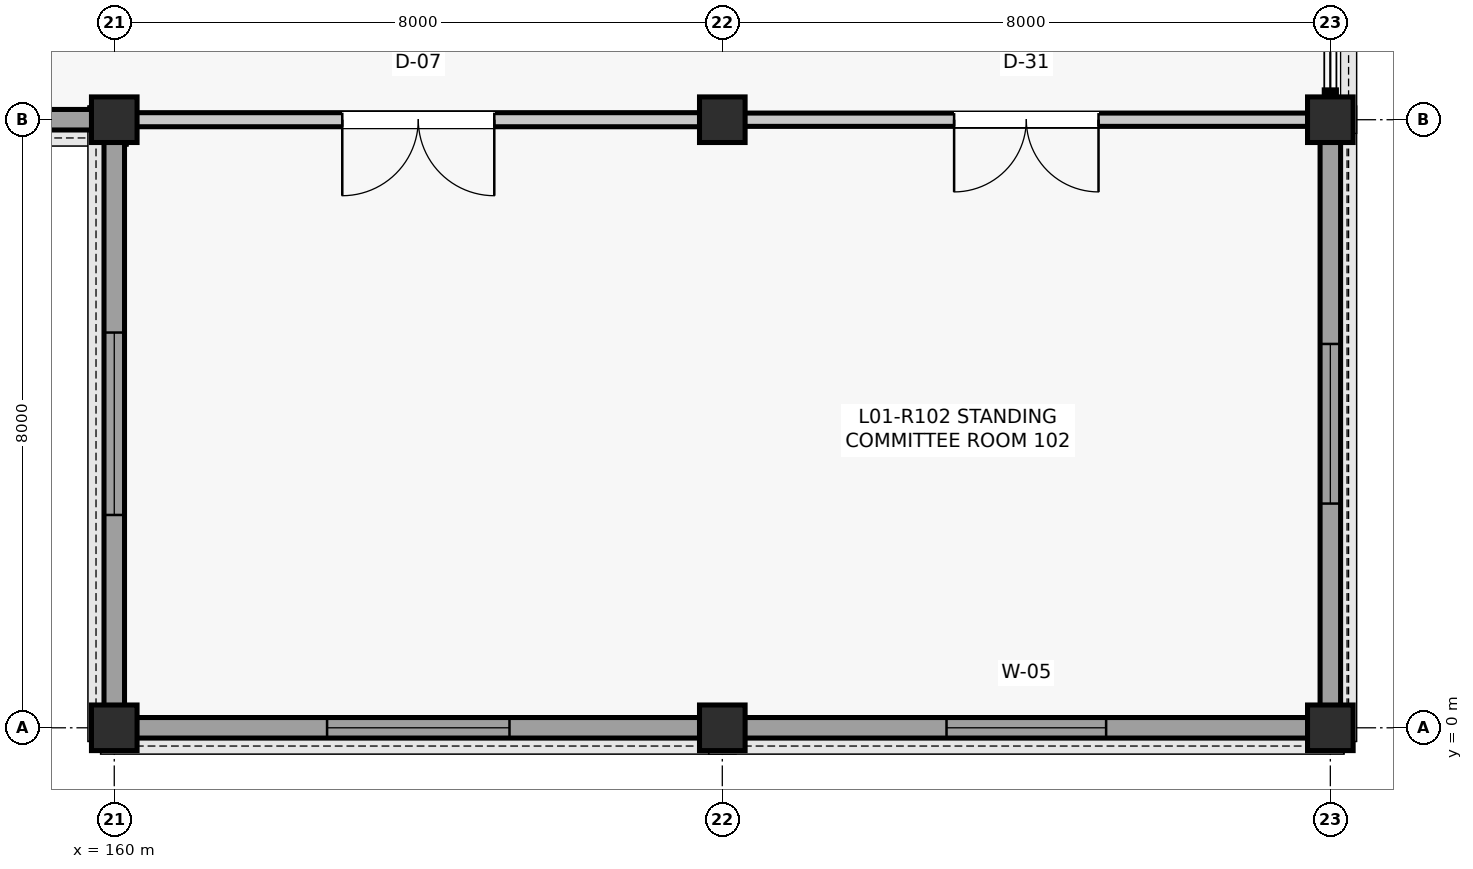
"""IFC4 building model, lengths in metres.
Left out: names, types, materials, properties, quantities, classifications, styles, units other than length and angle.
Written with IfcOpenShell. Run it as: python <this file> out.ifc"""

import sys

from ifc_helpers import new_model, si_unit, direction, frame, frame_2d, origin, origin_2d, place, context, subcontext, project, spatial, rectangle, extrude, element, fill, save


model = new_model("IFC4")
c1 = context("Model", 3, precision=1e-05, world=origin(), true_north=direction((0.0, 1.0)))
c2 = subcontext(c1, "Body", "Model", "MODEL_VIEW")
j1 = project(units=[si_unit("LENGTHUNIT", "METRE"), si_unit("PLANEANGLEUNIT", "RADIAN")], contexts=[c1])
p1 = place(None, origin())
s1 = spatial("IfcSite", under=j1, at=p1, CompositionType="ELEMENT")
p2 = place(p1, origin())
s2 = spatial("IfcBuilding", under=s1, at=p2, CompositionType="ELEMENT")
p3 = place(p2, frame((0.0, 0.0, 5.28)))
s3 = spatial("IfcBuildingStorey", under=s2, at=p3, CompositionType="ELEMENT", Elevation=5.28)
for number, where, z_axis, x_axis in (
    (1, (160.0, 0.0, 0.0), (0.0, 0.0, 1.0), (1.0, 0.0, 0.0)),
    (2, (160.0, 8.0, 0.0), (0.0, 0.0, 1.0), (1.0, 0.0, 0.0)),
    (3, (168.0, 0.0, 0.0), (0.0, 0.0, 1.0), (1.0, 0.0, 0.0)),
    (4, (168.0, 8.0, 0.0), (0.0, 0.0, 1.0), (1.0, 0.0, 0.0)),
    (5, (176.0, 0.0, 0.0), (0.0, 0.0, 1.0), (1.0, 0.0, 0.0)),
    (6, (176.0, 8.0, 0.0), (0.0, 0.0, 1.0), (1.0, 0.0, 0.0)),
):
    element("IfcColumn", number, at=place(p3, frame(where, z_axis=z_axis, x_axis=x_axis)), inside=s3, PredefinedType="COLUMN", context=c2, shape_type="SweptSolid", body=[
        extrude(rectangle(XDim=0.6, YDim=0.6, at=origin_2d()), origin(), (0.0, 0.0, 1.0), 4.62),
    ])
p4 = place(p3, frame((152.285, 8.0, 0.0), z_axis=(0.0, 0.0, 1.0), x_axis=(1.0, 0.0, 0.0)))
e7 = element("IfcWall", 7, at=p4, inside=s3, PredefinedType="SOLIDWALL", context=c2, shape_type="SweptSolid", body=[
    extrude(rectangle(XDim=7.43, YDim=0.27, at=frame_2d((3.715, 0.0))), origin(), (0.0, 0.0, 1.0), 3.974),
])
p5 = place(p4, frame((2.515, 0.0, 0.9)))
e8 = element("IfcOpeningElement", 8, at=p5, cuts=e7, PredefinedType="OPENING", context=c2, shape_type="SweptSolid", body=[
    extrude(rectangle(XDim=2.4, YDim=2.4, at=frame_2d((1.2, 1.2))), frame((0.0, 0.145, 0.0), z_axis=(0.0, -1.0, 0.0), x_axis=(1.0, 0.0, 0.0)), (0.0, 0.0, 1.0), 0.29),
])
p6 = place(p3, frame((160.285, 0.0, 0.0), z_axis=(0.0, 0.0, 1.0), x_axis=(1.0, 0.0, 0.0)))
e9 = element("IfcWall", 9, at=p6, inside=s3, PredefinedType="SOLIDWALL", context=c2, shape_type="SweptSolid", body=[
    extrude(rectangle(XDim=7.43, YDim=0.27, at=frame_2d((3.715, 0.0))), origin(), (0.0, 0.0, 1.0), 3.974),
])
p7 = place(p6, frame((2.515, 0.0, 0.9)))
e10 = element("IfcOpeningElement", 10, at=p7, cuts=e9, PredefinedType="OPENING", context=c2, shape_type="SweptSolid", body=[
    extrude(rectangle(XDim=2.4, YDim=2.4, at=frame_2d((1.2, 1.2))), frame((0.0, 0.145, 0.0), z_axis=(0.0, -1.0, 0.0), x_axis=(1.0, 0.0, 0.0)), (0.0, 0.0, 1.0), 0.29),
])
p8 = place(p3, frame((160.0, 0.285, 0.0), z_axis=(0.0, 0.0, 1.0), x_axis=(0.0, 1.0, 0.0)))
e11 = element("IfcWall", 11, at=p8, inside=s3, PredefinedType="SOLIDWALL", context=c2, shape_type="SweptSolid", body=[
    extrude(rectangle(XDim=7.43, YDim=0.27, at=frame_2d((3.715, 0.0))), origin(), (0.0, 0.0, 1.0), 3.974),
])
p9 = place(p8, frame((2.515, 0.0, 0.9)))
e12 = element("IfcOpeningElement", 12, at=p9, cuts=e11, PredefinedType="OPENING", context=c2, shape_type="SweptSolid", body=[
    extrude(rectangle(XDim=2.4, YDim=2.4, at=frame_2d((1.2, 1.2))), frame((0.0, 0.145, 0.0), z_axis=(0.0, -1.0, 0.0), x_axis=(1.0, 0.0, 0.0)), (0.0, 0.0, 1.0), 0.29),
])
p10 = place(p3, frame((168.285, 0.0, 0.0), z_axis=(0.0, 0.0, 1.0), x_axis=(1.0, 0.0, 0.0)))
e13 = element("IfcWall", 13, at=p10, inside=s3, PredefinedType="SOLIDWALL", context=c2, shape_type="SweptSolid", body=[
    extrude(rectangle(XDim=7.43, YDim=0.27, at=frame_2d((3.715, 0.0))), origin(), (0.0, 0.0, 1.0), 3.914),
])
p11 = place(p10, frame((2.665, 0.0, 0.9)))
e14 = element("IfcOpeningElement", 14, at=p11, cuts=e13, PredefinedType="OPENING", context=c2, shape_type="SweptSolid", body=[
    extrude(rectangle(XDim=2.1, YDim=2.4, at=frame_2d((1.05, 1.2))), frame((0.0, 0.145, 0.0), z_axis=(0.0, -1.0, 0.0), x_axis=(1.0, 0.0, 0.0)), (0.0, 0.0, 1.0), 0.29),
])
p12 = place(p3, frame((176.0, 0.285, 0.0), z_axis=(0.0, 0.0, 1.0), x_axis=(0.0, 1.0, 0.0)))
e15 = element("IfcWall", 15, at=p12, inside=s3, PredefinedType="SOLIDWALL", context=c2, shape_type="SweptSolid", body=[
    extrude(rectangle(XDim=7.43, YDim=0.27, at=frame_2d((3.715, 0.0))), origin(), (0.0, 0.0, 1.0), 3.977),
])
p13 = place(p12, frame((2.665, 0.0, 0.9)))
e16 = element("IfcOpeningElement", 16, at=p13, cuts=e15, PredefinedType="OPENING", context=c2, shape_type="SweptSolid", body=[
    extrude(rectangle(XDim=2.1, YDim=2.4, at=frame_2d((1.05, 1.2))), frame((0.0, 0.145, 0.0), z_axis=(0.0, -1.0, 0.0), x_axis=(1.0, 0.0, 0.0)), (0.0, 0.0, 1.0), 0.29),
])
p14 = place(p3, frame((160.29, 8.0, 0.0), z_axis=(0.0, 0.0, 1.0), x_axis=(1.0, 0.0, 0.0)))
e17 = element("IfcWall", 17, at=p14, inside=s3, PredefinedType="PARTITIONING", context=c2, shape_type="SweptSolid", body=[
    extrude(rectangle(XDim=7.42, YDim=0.185, at=frame_2d((3.71, 0.0))), origin(), (0.0, 0.0, 1.0), 3.787),
])
p15 = place(p14, frame((2.71, 0.0, 0.0)))
e18 = element("IfcOpeningElement", 18, at=p15, cuts=e17, PredefinedType="OPENING", context=c2, shape_type="SweptSolid", body=[
    extrude(rectangle(XDim=2.0, YDim=2.4, at=frame_2d((1.0, 1.2))), frame((0.0, 0.103, 0.0), z_axis=(0.0, -1.0, 0.0), x_axis=(1.0, 0.0, 0.0)), (0.0, 0.0, 1.0), 0.205),
])
p16 = place(p3, frame((168.29, 8.0, 0.0), z_axis=(0.0, 0.0, 1.0), x_axis=(1.0, 0.0, 0.0)))
e19 = element("IfcWall", 19, at=p16, inside=s3, PredefinedType="PARTITIONING", context=c2, shape_type="SweptSolid", body=[
    extrude(rectangle(XDim=7.42, YDim=0.175, at=frame_2d((3.71, 0.0))), origin(), (0.0, 0.0, 1.0), 3.771),
])
p17 = place(p16, frame((2.76, 0.0, 0.0)))
e20 = element("IfcOpeningElement", 20, at=p17, cuts=e19, PredefinedType="OPENING", context=c2, shape_type="SweptSolid", body=[
    extrude(rectangle(XDim=1.9, YDim=2.38, at=frame_2d((0.95, 1.19))), frame((0.0, 0.097, 0.0), z_axis=(0.0, -1.0, 0.0), x_axis=(1.0, 0.0, 0.0)), (0.0, 0.0, 1.0), 0.195),
])
p18 = place(p7, origin())
e21 = element("IfcWindow", 21, at=p18, inside=s3, PartitioningType="SINGLE_PANEL", PredefinedType="WINDOW", context=c2, shape_type="SweptSolid", body=[
    extrude(rectangle(XDim=2.4, YDim=2.4, at=frame_2d((1.2, 1.2))), frame((0.0, 0.03, 0.0), z_axis=(0.0, -1.0, 0.0), x_axis=(1.0, 0.0, 0.0)), (0.0, 0.0, 1.0), 0.06),
])
fill(e10, e21)
p19 = place(p9, origin())
e22 = element("IfcWindow", 22, at=p19, inside=s3, PartitioningType="SINGLE_PANEL", PredefinedType="WINDOW", context=c2, shape_type="SweptSolid", body=[
    extrude(rectangle(XDim=2.4, YDim=2.4, at=frame_2d((1.2, 1.2))), frame((0.0, 0.03, 0.0), z_axis=(0.0, -1.0, 0.0), x_axis=(1.0, 0.0, 0.0)), (0.0, 0.0, 1.0), 0.06),
])
fill(e12, e22)
p20 = place(p11, origin())
e23 = element("IfcWindow", 23, at=p20, inside=s3, PartitioningType="SINGLE_PANEL", PredefinedType="WINDOW", context=c2, shape_type="SweptSolid", body=[
    extrude(rectangle(XDim=2.1, YDim=2.4, at=frame_2d((1.05, 1.2))), frame((0.0, 0.03, 0.0), z_axis=(0.0, -1.0, 0.0), x_axis=(1.0, 0.0, 0.0)), (0.0, 0.0, 1.0), 0.06),
])
fill(e14, e23)
p21 = place(p13, origin())
e24 = element("IfcWindow", 24, at=p21, inside=s3, PartitioningType="SINGLE_PANEL", PredefinedType="WINDOW", context=c2, shape_type="SweptSolid", body=[
    extrude(rectangle(XDim=2.1, YDim=2.4, at=frame_2d((1.05, 1.2))), frame((0.0, 0.03, 0.0), z_axis=(0.0, -1.0, 0.0), x_axis=(1.0, 0.0, 0.0)), (0.0, 0.0, 1.0), 0.06),
])
fill(e16, e24)
p22 = place(p15, frame((2.0, 0.0, 0.0), z_axis=(0.0, 0.0, 1.0), x_axis=(-1.0, 0.0, 0.0)))
e25 = element("IfcDoor", 25, at=p22, inside=s3, OperationType="DOUBLE_DOOR_SINGLE_SWING", PredefinedType="DOOR", context=c2, shape_type="SweptSolid", body=[
    extrude(rectangle(XDim=2.0, YDim=2.4, at=frame_2d((1.0, 1.2))), frame((0.0, 0.025, 0.0), z_axis=(0.0, -1.0, 0.0), x_axis=(1.0, 0.0, 0.0)), (0.0, 0.0, 1.0), 0.05),
])
fill(e18, e25)
p23 = place(p17, frame((1.9, 0.0, 0.0), z_axis=(0.0, 0.0, 1.0), x_axis=(-1.0, 0.0, 0.0)))
e26 = element("IfcDoor", 26, at=p23, inside=s3, OperationType="DOUBLE_DOOR_SINGLE_SWING", PredefinedType="DOOR", context=c2, shape_type="SweptSolid", body=[
    extrude(rectangle(XDim=1.9, YDim=2.38, at=frame_2d((0.95, 1.19))), frame((0.0, 0.025, 0.0), z_axis=(0.0, -1.0, 0.0), x_axis=(1.0, 0.0, 0.0)), (0.0, 0.0, 1.0), 0.05),
])
fill(e20, e26)
save(model, sys.argv[1])
